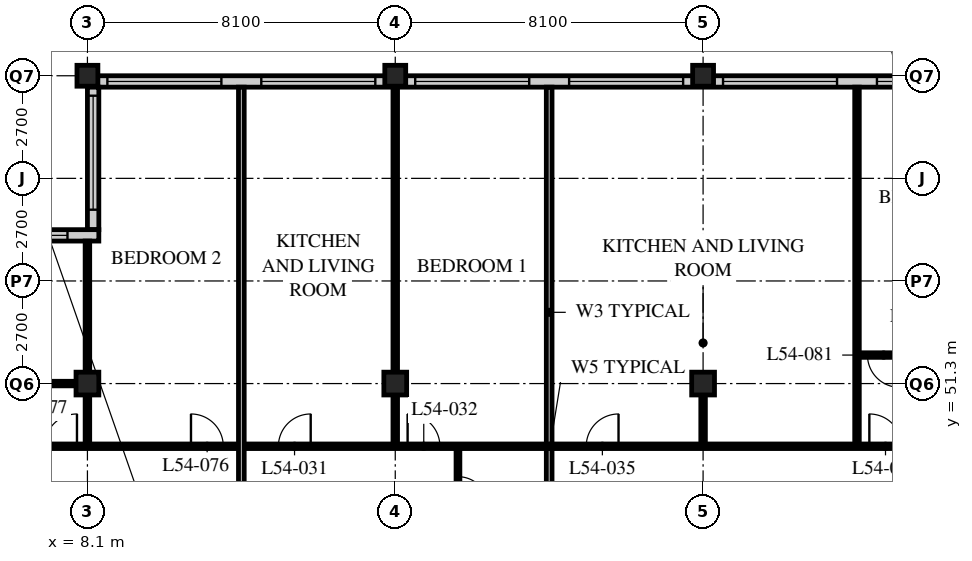
"""IFC4 building model, lengths in metres.
Left out: names, types, materials, properties, quantities, classifications, styles, units other than length and angle.
Written with IfcOpenShell. Run it as: python <this file> out.ifc"""

import sys

from ifc_helpers import new_model, si_unit, direction, frame, frame_2d, origin, origin_2d, place, context, subcontext, project, spatial, rectangle, hollow_rectangle, extrude, element, fill, save


model = new_model("IFC4")
c1 = context("Model", 3, precision=1e-05, world=origin(), true_north=direction((0.0, 1.0)))
c2 = subcontext(c1, "Body", "Model", "MODEL_VIEW")
j1 = project(units=[si_unit("LENGTHUNIT", "METRE"), si_unit("PLANEANGLEUNIT", "RADIAN")], contexts=[c1])
p1 = place(None, origin())
s1 = spatial("IfcSite", under=j1, at=p1, CompositionType="ELEMENT")
p2 = place(p1, origin())
s2 = spatial("IfcBuilding", under=s1, at=p2, CompositionType="ELEMENT")
p3 = place(p2, frame((0.0, 0.0, 210.0)))
s3 = spatial("IfcBuildingStorey", under=s2, at=p3, CompositionType="ELEMENT", Elevation=210.0)
p4 = place(p3, frame((8.1, 51.3, 0.0), z_axis=(0.0, 0.0, 1.0), x_axis=(1.0, 0.0, 0.0)))
e1 = element("IfcColumn", 1, at=p4, inside=s3, PredefinedType="COLUMN", context=c2, shape_type="SweptSolid", body=[
    extrude(hollow_rectangle(XDim=0.6, YDim=0.6, WallThickness=0.05, at=origin_2d()), origin(), (0.0, 0.0, 1.0), 3.6),
])
p5 = place(p3, frame((8.1, 59.4, 0.0), z_axis=(0.0, 0.0, 1.0), x_axis=(1.0, 0.0, 0.0)))
e2 = element("IfcColumn", 2, at=p5, inside=s3, PredefinedType="COLUMN", context=c2, shape_type="SweptSolid", body=[
    extrude(hollow_rectangle(XDim=0.55, YDim=0.55, WallThickness=0.045, at=origin_2d()), origin(), (0.0, 0.0, 1.0), 3.6),
])
p6 = place(p3, frame((16.2, 51.3, 0.0), z_axis=(0.0, 0.0, 1.0), x_axis=(1.0, 0.0, 0.0)))
e3 = element("IfcColumn", 3, at=p6, inside=s3, PredefinedType="COLUMN", context=c2, shape_type="SweptSolid", body=[
    extrude(hollow_rectangle(XDim=0.6, YDim=0.6, WallThickness=0.05, at=origin_2d()), origin(), (0.0, 0.0, 1.0), 3.6),
])
p7 = place(p3, frame((16.2, 59.4, 0.0), z_axis=(0.0, 0.0, 1.0), x_axis=(1.0, 0.0, 0.0)))
e4 = element("IfcColumn", 4, at=p7, inside=s3, PredefinedType="COLUMN", context=c2, shape_type="SweptSolid", body=[
    extrude(hollow_rectangle(XDim=0.55, YDim=0.55, WallThickness=0.045, at=origin_2d()), origin(), (0.0, 0.0, 1.0), 3.6),
])
p8 = place(p3, frame((24.3, 51.3, 0.0), z_axis=(0.0, 0.0, 1.0), x_axis=(1.0, 0.0, 0.0)))
e5 = element("IfcColumn", 5, at=p8, inside=s3, PredefinedType="COLUMN", context=c2, shape_type="SweptSolid", body=[
    extrude(hollow_rectangle(XDim=0.6, YDim=0.6, WallThickness=0.05, at=origin_2d()), origin(), (0.0, 0.0, 1.0), 3.6),
])
p9 = place(p3, frame((24.3, 59.4, 0.0), z_axis=(0.0, 0.0, 1.0), x_axis=(1.0, 0.0, 0.0)))
e6 = element("IfcColumn", 6, at=p9, inside=s3, PredefinedType="COLUMN", context=c2, shape_type="SweptSolid", body=[
    extrude(hollow_rectangle(XDim=0.55, YDim=0.55, WallThickness=0.045, at=origin_2d()), origin(), (0.0, 0.0, 1.0), 3.6),
])
p10 = place(p3, frame((48.3, 59.25, 0.0), z_axis=(0.0, 0.0, 1.0), x_axis=(-1.0, 0.0, 0.0)))
e7 = element("IfcWall", 7, at=p10, inside=s3, PredefinedType="SOLIDWALL", context=c2, shape_type="SweptSolid", body=[
    extrude(rectangle(XDim=40.2, YDim=0.3, at=frame_2d((20.1, 0.0))), origin(), (0.0, 0.0, 1.0), 3.39),
])
p11 = place(p10, frame((0.225, 0.0, 0.6)))
e8 = element("IfcOpeningElement", 8, at=p11, cuts=e7, PredefinedType="OPENING", context=c2, shape_type="SweptSolid", body=[
    extrude(rectangle(XDim=3.0, YDim=2.4, at=frame_2d((1.5, 1.2))), frame((0.0, 0.16, 0.0), z_axis=(0.0, -1.0, 0.0), x_axis=(1.0, 0.0, 0.0)), (0.0, 0.0, 1.0), 0.32),
])
p12 = place(p10, frame((4.275, 0.0, 0.6)))
e9 = element("IfcOpeningElement", 9, at=p12, cuts=e7, PredefinedType="OPENING", context=c2, shape_type="SweptSolid", body=[
    extrude(rectangle(XDim=3.0, YDim=2.4, at=frame_2d((1.5, 1.2))), frame((0.0, 0.16, 0.0), z_axis=(0.0, -1.0, 0.0), x_axis=(1.0, 0.0, 0.0)), (0.0, 0.0, 1.0), 0.32),
])
p13 = place(p10, frame((8.325, 0.0, 0.6)))
e10 = element("IfcOpeningElement", 10, at=p13, cuts=e7, PredefinedType="OPENING", context=c2, shape_type="SweptSolid", body=[
    extrude(rectangle(XDim=3.0, YDim=2.4, at=frame_2d((1.5, 1.2))), frame((0.0, 0.16, 0.0), z_axis=(0.0, -1.0, 0.0), x_axis=(1.0, 0.0, 0.0)), (0.0, 0.0, 1.0), 0.32),
])
p14 = place(p10, frame((12.375, 0.0, 0.6)))
e11 = element("IfcOpeningElement", 11, at=p14, cuts=e7, PredefinedType="OPENING", context=c2, shape_type="SweptSolid", body=[
    extrude(rectangle(XDim=3.0, YDim=2.4, at=frame_2d((1.5, 1.2))), frame((0.0, 0.16, 0.0), z_axis=(0.0, -1.0, 0.0), x_axis=(1.0, 0.0, 0.0)), (0.0, 0.0, 1.0), 0.32),
])
p15 = place(p10, frame((16.425, 0.0, 0.6)))
e12 = element("IfcOpeningElement", 12, at=p15, cuts=e7, PredefinedType="OPENING", context=c2, shape_type="SweptSolid", body=[
    extrude(rectangle(XDim=3.0, YDim=2.4, at=frame_2d((1.5, 1.2))), frame((0.0, 0.16, 0.0), z_axis=(0.0, -1.0, 0.0), x_axis=(1.0, 0.0, 0.0)), (0.0, 0.0, 1.0), 0.32),
])
p16 = place(p10, frame((20.475, 0.0, 0.6)))
e13 = element("IfcOpeningElement", 13, at=p16, cuts=e7, PredefinedType="OPENING", context=c2, shape_type="SweptSolid", body=[
    extrude(rectangle(XDim=3.0, YDim=2.4, at=frame_2d((1.5, 1.2))), frame((0.0, 0.16, 0.0), z_axis=(0.0, -1.0, 0.0), x_axis=(1.0, 0.0, 0.0)), (0.0, 0.0, 1.0), 0.32),
])
p17 = place(p10, frame((24.525, 0.0, 0.6)))
e14 = element("IfcOpeningElement", 14, at=p17, cuts=e7, PredefinedType="OPENING", context=c2, shape_type="SweptSolid", body=[
    extrude(rectangle(XDim=3.0, YDim=2.4, at=frame_2d((1.5, 1.2))), frame((0.0, 0.16, 0.0), z_axis=(0.0, -1.0, 0.0), x_axis=(1.0, 0.0, 0.0)), (0.0, 0.0, 1.0), 0.32),
])
p18 = place(p10, frame((28.575, 0.0, 0.6)))
e15 = element("IfcOpeningElement", 15, at=p18, cuts=e7, PredefinedType="OPENING", context=c2, shape_type="SweptSolid", body=[
    extrude(rectangle(XDim=3.0, YDim=2.4, at=frame_2d((1.5, 1.2))), frame((0.0, 0.16, 0.0), z_axis=(0.0, -1.0, 0.0), x_axis=(1.0, 0.0, 0.0)), (0.0, 0.0, 1.0), 0.32),
])
p19 = place(p10, frame((32.625, 0.0, 0.6)))
e16 = element("IfcOpeningElement", 16, at=p19, cuts=e7, PredefinedType="OPENING", context=c2, shape_type="SweptSolid", body=[
    extrude(rectangle(XDim=3.0, YDim=2.4, at=frame_2d((1.5, 1.2))), frame((0.0, 0.16, 0.0), z_axis=(0.0, -1.0, 0.0), x_axis=(1.0, 0.0, 0.0)), (0.0, 0.0, 1.0), 0.32),
])
p20 = place(p10, frame((36.675, 0.0, 0.6)))
e17 = element("IfcOpeningElement", 17, at=p20, cuts=e7, PredefinedType="OPENING", context=c2, shape_type="SweptSolid", body=[
    extrude(rectangle(XDim=3.0, YDim=2.4, at=frame_2d((1.5, 1.2))), frame((0.0, 0.16, 0.0), z_axis=(0.0, -1.0, 0.0), x_axis=(1.0, 0.0, 0.0)), (0.0, 0.0, 1.0), 0.32),
])
p21 = place(p3, frame((8.25, 59.1, 0.0), z_axis=(0.0, 0.0, 1.0), x_axis=(0.0, -1.0, 0.0)))
e18 = element("IfcWall", 18, at=p21, inside=s3, PredefinedType="SOLIDWALL", context=c2, shape_type="SweptSolid", body=[
    extrude(rectangle(XDim=3.75, YDim=0.3, at=frame_2d((1.875, 0.0))), origin(), (0.0, 0.0, 1.0), 3.39),
])
p22 = place(p21, frame((0.225, 0.0, 0.6)))
e19 = element("IfcOpeningElement", 19, at=p22, cuts=e18, PredefinedType="OPENING", context=c2, shape_type="SweptSolid", body=[
    extrude(rectangle(XDim=3.0, YDim=2.0, at=frame_2d((1.5, 1.0))), frame((0.0, 0.16, 0.0), z_axis=(0.0, -1.0, 0.0), x_axis=(1.0, 0.0, 0.0)), (0.0, 0.0, 1.0), 0.32),
])
p23 = place(p3, frame((8.4, 55.2, 0.0), z_axis=(0.0, 0.0, 1.0), x_axis=(-1.0, 0.0, 0.0)))
e20 = element("IfcWall", 20, at=p23, inside=s3, PredefinedType="SOLIDWALL", context=c2, shape_type="SweptSolid", body=[
    extrude(rectangle(XDim=4.35, YDim=0.3, at=frame_2d((2.175, 0.0))), origin(), (0.0, 0.0, 1.0), 3.39),
])
p24 = place(p23, frame((0.825, 0.0, 0.6)))
e21 = element("IfcOpeningElement", 21, at=p24, cuts=e20, PredefinedType="OPENING", context=c2, shape_type="SweptSolid", body=[
    extrude(rectangle(XDim=3.0, YDim=2.0, at=frame_2d((1.5, 1.0))), frame((0.0, 0.16, 0.0), z_axis=(0.0, -1.0, 0.0), x_axis=(1.0, 0.0, 0.0)), (0.0, 0.0, 1.0), 0.32),
])
p25 = place(p3, frame((17.85, 47.25, 0.0), z_axis=(0.0, 0.0, 1.0), x_axis=(0.0, 1.0, 0.0)))
e22 = element("IfcWall", 22, at=p25, inside=s3, PredefinedType="PARTITIONING", context=c2, shape_type="SweptSolid", body=[
    extrude(rectangle(XDim=2.4, YDim=0.1, at=frame_2d((1.2, 0.0))), origin(), (0.0, 0.0, 1.0), 3.39),
])
p26 = place(p25, frame((0.8, 0.0, 0.0)))
e23 = element("IfcOpeningElement", 23, at=p26, cuts=e22, PredefinedType="OPENING", context=c2, shape_type="SweptSolid", body=[
    extrude(rectangle(XDim=0.8, YDim=2.1, at=frame_2d((0.4, 1.05))), frame((0.0, 0.06, 0.0), z_axis=(0.0, -1.0, 0.0), x_axis=(1.0, 0.0, 0.0)), (0.0, 0.0, 1.0), 0.12),
])
p27 = place(p3, frame((16.2, 49.65, 0.0), z_axis=(0.0, 0.0, 1.0), x_axis=(0.0, 1.0, 0.0)))
e24 = element("IfcWall", 24, at=p27, inside=s3, PredefinedType="PARTITIONING", context=c2, shape_type="SweptSolid", body=[
    extrude(rectangle(XDim=9.45, YDim=0.12, at=frame_2d((4.725, 0.0))), origin(), (0.0, 0.0, 1.0), 2.778),
])
p28 = place(p3, frame((20.25, 47.25, 0.0), z_axis=(0.0, 0.0, 1.0), x_axis=(0.0, 1.0, 0.0)))
e25 = element("IfcWall", 25, at=p28, inside=s3, PredefinedType="PARTITIONING", context=c2, shape_type="SweptSolid", body=[
    extrude(rectangle(XDim=11.85, YDim=0.15, at=frame_2d((5.925, 0.0))), origin(), (0.0, 0.0, 1.0), 3.39),
])
p29 = place(p3, frame((28.35, 49.65, 0.0), z_axis=(0.0, 0.0, 1.0), x_axis=(0.0, 1.0, 0.0)))
e26 = element("IfcWall", 26, at=p29, inside=s3, PredefinedType="PARTITIONING", context=c2, shape_type="SweptSolid", body=[
    extrude(rectangle(XDim=9.45, YDim=0.12, at=frame_2d((4.725, 0.0))), origin(), (0.0, 0.0, 1.0), 3.39),
])
p30 = place(p3, frame((4.1, 49.65, 0.0), z_axis=(0.0, 0.0, 1.0), x_axis=(1.0, 0.0, 0.0)))
e27 = element("IfcWall", 27, at=p30, inside=s3, PredefinedType="PARTITIONING", context=c2, shape_type="SweptSolid", body=[
    extrude(rectangle(XDim=32.35, YDim=0.12, at=frame_2d((16.175, 0.0))), origin(), (0.0, 0.0, 1.0), 3.39),
])
p31 = place(p30, frame((9.025, 0.0, 0.0)))
e28 = element("IfcOpeningElement", 28, at=p31, cuts=e27, PredefinedType="OPENING", context=c2, shape_type="SweptSolid", body=[
    extrude(rectangle(XDim=0.85, YDim=2.1, at=frame_2d((0.425, 1.05))), frame((0.0, 0.07, 0.0), z_axis=(0.0, -1.0, 0.0), x_axis=(1.0, 0.0, 0.0)), (0.0, 0.0, 1.0), 0.14),
])
p32 = place(p30, frame((12.425, 0.0, 0.0)))
e29 = element("IfcOpeningElement", 29, at=p32, cuts=e27, PredefinedType="OPENING", context=c2, shape_type="SweptSolid", body=[
    extrude(rectangle(XDim=0.85, YDim=2.1, at=frame_2d((0.425, 1.05))), frame((0.0, 0.07, 0.0), z_axis=(0.0, -1.0, 0.0), x_axis=(1.0, 0.0, 0.0)), (0.0, 0.0, 1.0), 0.14),
])
p33 = place(p30, frame((17.125, 0.0, 0.0)))
e30 = element("IfcOpeningElement", 30, at=p33, cuts=e27, PredefinedType="OPENING", context=c2, shape_type="SweptSolid", body=[
    extrude(rectangle(XDim=0.85, YDim=2.1, at=frame_2d((0.425, 1.05))), frame((0.0, 0.07, 0.0), z_axis=(0.0, -1.0, 0.0), x_axis=(1.0, 0.0, 0.0)), (0.0, 0.0, 1.0), 0.14),
])
p34 = place(p30, frame((24.575, 0.0, 0.0)))
e31 = element("IfcOpeningElement", 31, at=p34, cuts=e27, PredefinedType="OPENING", context=c2, shape_type="SweptSolid", body=[
    extrude(rectangle(XDim=0.85, YDim=2.1, at=frame_2d((0.425, 1.05))), frame((0.0, 0.07, 0.0), z_axis=(0.0, -1.0, 0.0), x_axis=(1.0, 0.0, 0.0)), (0.0, 0.0, 1.0), 0.14),
])
p35 = place(p30, frame((28.625, 0.0, 0.0)))
e32 = element("IfcOpeningElement", 32, at=p35, cuts=e27, PredefinedType="OPENING", context=c2, shape_type="SweptSolid", body=[
    extrude(rectangle(XDim=0.85, YDim=2.1, at=frame_2d((0.425, 1.05))), frame((0.0, 0.07, 0.0), z_axis=(0.0, -1.0, 0.0), x_axis=(1.0, 0.0, 0.0)), (0.0, 0.0, 1.0), 0.14),
])
p36 = place(p30, frame((6.725, 0.0, 0.0)))
e33 = element("IfcOpeningElement", 33, at=p36, cuts=e27, PredefinedType="OPENING", context=c2, shape_type="SweptSolid", body=[
    extrude(rectangle(XDim=0.85, YDim=2.1, at=frame_2d((0.425, 1.05))), frame((0.0, 0.07, 0.0), z_axis=(0.0, -1.0, 0.0), x_axis=(1.0, 0.0, 0.0)), (0.0, 0.0, 1.0), 0.14),
])
p37 = place(p30, frame((2.875, 0.0, 0.0)))
e34 = element("IfcOpeningElement", 34, at=p37, cuts=e27, PredefinedType="OPENING", context=c2, shape_type="SweptSolid", body=[
    extrude(rectangle(XDim=0.85, YDim=2.1, at=frame_2d((0.425, 1.05))), frame((0.0, 0.07, 0.0), z_axis=(0.0, -1.0, 0.0), x_axis=(1.0, 0.0, 0.0)), (0.0, 0.0, 1.0), 0.14),
])
p38 = place(p3, frame((8.1, 49.65, 0.0), z_axis=(0.0, 0.0, 1.0), x_axis=(0.0, 1.0, 0.0)))
e35 = element("IfcWall", 35, at=p38, inside=s3, PredefinedType="PARTITIONING", context=c2, shape_type="SweptSolid", body=[
    extrude(rectangle(XDim=5.4, YDim=0.12, at=frame_2d((2.7, 0.0))), origin(), (0.0, 0.0, 1.0), 2.778),
])
p39 = place(p3, frame((8.1, 51.3, 0.0), z_axis=(0.0, 0.0, 1.0), x_axis=(-1.0, 0.0, 0.0)))
e36 = element("IfcWall", 36, at=p39, inside=s3, PredefinedType="PARTITIONING", context=c2, shape_type="SweptSolid", body=[
    extrude(rectangle(XDim=3.75, YDim=0.12, at=frame_2d((1.875, 0.0))), origin(), (0.0, 0.0, 1.0), 2.778),
])
p40 = place(p39, frame((1.875, 0.0, 0.0)))
e37 = element("IfcOpeningElement", 37, at=p40, cuts=e36, PredefinedType="OPENING", context=c2, shape_type="SweptSolid", body=[
    extrude(rectangle(XDim=0.85, YDim=2.1, at=frame_2d((0.425, 1.05))), frame((0.0, 0.07, 0.0), z_axis=(0.0, -1.0, 0.0), x_axis=(1.0, 0.0, 0.0)), (0.0, 0.0, 1.0), 0.14),
])
p41 = place(p3, frame((12.15, 47.25, 0.0), z_axis=(0.0, 0.0, 1.0), x_axis=(0.0, 1.0, 0.0)))
e38 = element("IfcWall", 38, at=p41, inside=s3, PredefinedType="PARTITIONING", context=c2, shape_type="SweptSolid", body=[
    extrude(rectangle(XDim=11.85, YDim=0.15, at=frame_2d((5.925, 0.0))), origin(), (0.0, 0.0, 1.0), 3.39),
])
p42 = place(p3, frame((28.35, 52.05, 0.0), z_axis=(0.0, 0.0, 1.0), x_axis=(1.0, 0.0, 0.0)))
e39 = element("IfcWall", 39, at=p42, inside=s3, PredefinedType="PARTITIONING", context=c2, shape_type="SweptSolid", body=[
    extrude(rectangle(XDim=1.76, YDim=0.12, at=frame_2d((0.88, 0.0))), origin(), (0.0, 0.0, 1.0), 3.39),
])
p43 = place(p42, frame((0.275, 0.0, 0.0)))
e40 = element("IfcOpeningElement", 40, at=p43, cuts=e39, PredefinedType="OPENING", context=c2, shape_type="SweptSolid", body=[
    extrude(rectangle(XDim=0.85, YDim=2.1, at=frame_2d((0.425, 1.05))), frame((0.0, 0.07, 0.0), z_axis=(0.0, -1.0, 0.0), x_axis=(1.0, 0.0, 0.0)), (0.0, 0.0, 1.0), 0.14),
])
p44 = place(p3, frame((24.3, 49.65, 0.0), z_axis=(0.0, 0.0, 1.0), x_axis=(0.0, 1.0, 0.0)))
e41 = element("IfcWall", 41, at=p44, inside=s3, PredefinedType="PARTITIONING", context=c2, shape_type="SweptSolid", body=[
    extrude(rectangle(XDim=1.35, YDim=0.12, at=frame_2d((0.675, 0.0))), origin(), (0.0, 0.0, 1.0), 2.778),
])
p45 = place(p15, origin())
e42 = element("IfcWindow", 42, at=p45, inside=s3, PartitioningType="SINGLE_PANEL", PredefinedType="WINDOW", context=c2, shape_type="SweptSolid", body=[
    extrude(rectangle(XDim=3.0, YDim=2.4, at=frame_2d((1.5, 1.2))), frame((0.0, 0.03, 0.0), z_axis=(0.0, -1.0, 0.0), x_axis=(1.0, 0.0, 0.0)), (0.0, 0.0, 1.0), 0.06),
])
fill(e12, e42)
p46 = place(p16, origin())
e43 = element("IfcWindow", 43, at=p46, inside=s3, PartitioningType="SINGLE_PANEL", PredefinedType="WINDOW", context=c2, shape_type="SweptSolid", body=[
    extrude(rectangle(XDim=3.0, YDim=2.4, at=frame_2d((1.5, 1.2))), frame((0.0, 0.03, 0.0), z_axis=(0.0, -1.0, 0.0), x_axis=(1.0, 0.0, 0.0)), (0.0, 0.0, 1.0), 0.06),
])
fill(e13, e43)
p47 = place(p17, origin())
e44 = element("IfcWindow", 44, at=p47, inside=s3, PartitioningType="SINGLE_PANEL", PredefinedType="WINDOW", context=c2, shape_type="SweptSolid", body=[
    extrude(rectangle(XDim=3.0, YDim=2.4, at=frame_2d((1.5, 1.2))), frame((0.0, 0.03, 0.0), z_axis=(0.0, -1.0, 0.0), x_axis=(1.0, 0.0, 0.0)), (0.0, 0.0, 1.0), 0.06),
])
fill(e14, e44)
p48 = place(p18, origin())
e45 = element("IfcWindow", 45, at=p48, inside=s3, PartitioningType="SINGLE_PANEL", PredefinedType="WINDOW", context=c2, shape_type="SweptSolid", body=[
    extrude(rectangle(XDim=3.0, YDim=2.4, at=frame_2d((1.5, 1.2))), frame((0.0, 0.03, 0.0), z_axis=(0.0, -1.0, 0.0), x_axis=(1.0, 0.0, 0.0)), (0.0, 0.0, 1.0), 0.06),
])
fill(e15, e45)
p49 = place(p19, origin())
e46 = element("IfcWindow", 46, at=p49, inside=s3, PartitioningType="SINGLE_PANEL", PredefinedType="WINDOW", context=c2, shape_type="SweptSolid", body=[
    extrude(rectangle(XDim=3.0, YDim=2.4, at=frame_2d((1.5, 1.2))), frame((0.0, 0.03, 0.0), z_axis=(0.0, -1.0, 0.0), x_axis=(1.0, 0.0, 0.0)), (0.0, 0.0, 1.0), 0.06),
])
fill(e16, e46)
p50 = place(p20, origin())
e47 = element("IfcWindow", 47, at=p50, inside=s3, PartitioningType="SINGLE_PANEL", PredefinedType="WINDOW", context=c2, shape_type="SweptSolid", body=[
    extrude(rectangle(XDim=3.0, YDim=2.4, at=frame_2d((1.5, 1.2))), frame((0.0, 0.03, 0.0), z_axis=(0.0, -1.0, 0.0), x_axis=(1.0, 0.0, 0.0)), (0.0, 0.0, 1.0), 0.06),
])
fill(e17, e47)
p51 = place(p22, origin())
e48 = element("IfcWindow", 48, at=p51, inside=s3, PartitioningType="SINGLE_PANEL", PredefinedType="WINDOW", context=c2, shape_type="SweptSolid", body=[
    extrude(rectangle(XDim=3.0, YDim=2.0, at=frame_2d((1.5, 1.0))), frame((0.0, 0.03, 0.0), z_axis=(0.0, -1.0, 0.0), x_axis=(1.0, 0.0, 0.0)), (0.0, 0.0, 1.0), 0.06),
])
fill(e19, e48)
p52 = place(p24, origin())
e49 = element("IfcWindow", 49, at=p52, inside=s3, PartitioningType="SINGLE_PANEL", PredefinedType="WINDOW", context=c2, shape_type="SweptSolid", body=[
    extrude(rectangle(XDim=3.0, YDim=2.0, at=frame_2d((1.5, 1.0))), frame((0.0, 0.03, 0.0), z_axis=(0.0, -1.0, 0.0), x_axis=(1.0, 0.0, 0.0)), (0.0, 0.0, 1.0), 0.06),
])
fill(e21, e49)
p53 = place(p26, origin())
e50 = element("IfcDoor", 50, at=p53, inside=s3, OperationType="SINGLE_SWING_RIGHT", PredefinedType="DOOR", context=c2, shape_type="SweptSolid", body=[
    extrude(rectangle(XDim=0.8, YDim=2.1, at=frame_2d((0.4, 1.05))), frame((0.0, 0.025, 0.0), z_axis=(0.0, -1.0, 0.0), x_axis=(1.0, 0.0, 0.0)), (0.0, 0.0, 1.0), 0.05),
])
fill(e23, e50)
p54 = place(p31, origin())
e51 = element("IfcDoor", 51, at=p54, inside=s3, OperationType="SINGLE_SWING_RIGHT", PredefinedType="DOOR", context=c2, shape_type="SweptSolid", body=[
    extrude(rectangle(XDim=0.85, YDim=2.1, at=frame_2d((0.425, 1.05))), frame((0.0, 0.025, 0.0), z_axis=(0.0, -1.0, 0.0), x_axis=(1.0, 0.0, 0.0)), (0.0, 0.0, 1.0), 0.05),
])
fill(e28, e51)
p55 = place(p32, origin())
e52 = element("IfcDoor", 52, at=p55, inside=s3, OperationType="SINGLE_SWING_LEFT", PredefinedType="DOOR", context=c2, shape_type="SweptSolid", body=[
    extrude(rectangle(XDim=0.85, YDim=2.1, at=frame_2d((0.425, 1.05))), frame((0.0, 0.025, 0.0), z_axis=(0.0, -1.0, 0.0), x_axis=(1.0, 0.0, 0.0)), (0.0, 0.0, 1.0), 0.05),
])
fill(e29, e52)
p56 = place(p33, origin())
e53 = element("IfcDoor", 53, at=p56, inside=s3, OperationType="SINGLE_SWING_RIGHT", PredefinedType="DOOR", context=c2, shape_type="SweptSolid", body=[
    extrude(rectangle(XDim=0.85, YDim=2.1, at=frame_2d((0.425, 1.05))), frame((0.0, 0.025, 0.0), z_axis=(0.0, -1.0, 0.0), x_axis=(1.0, 0.0, 0.0)), (0.0, 0.0, 1.0), 0.05),
])
fill(e30, e53)
p57 = place(p34, origin())
e54 = element("IfcDoor", 54, at=p57, inside=s3, OperationType="SINGLE_SWING_LEFT", PredefinedType="DOOR", context=c2, shape_type="SweptSolid", body=[
    extrude(rectangle(XDim=0.85, YDim=2.1, at=frame_2d((0.425, 1.05))), frame((0.0, 0.025, 0.0), z_axis=(0.0, -1.0, 0.0), x_axis=(1.0, 0.0, 0.0)), (0.0, 0.0, 1.0), 0.05),
])
fill(e31, e54)
p58 = place(p36, origin())
e55 = element("IfcDoor", 55, at=p58, inside=s3, OperationType="SINGLE_SWING_LEFT", PredefinedType="DOOR", context=c2, shape_type="SweptSolid", body=[
    extrude(rectangle(XDim=0.85, YDim=2.1, at=frame_2d((0.425, 1.05))), frame((0.0, 0.025, 0.0), z_axis=(0.0, -1.0, 0.0), x_axis=(1.0, 0.0, 0.0)), (0.0, 0.0, 1.0), 0.05),
])
fill(e33, e55)
p59 = place(p37, origin())
e56 = element("IfcDoor", 56, at=p59, inside=s3, OperationType="SINGLE_SWING_RIGHT", PredefinedType="DOOR", context=c2, shape_type="SweptSolid", body=[
    extrude(rectangle(XDim=0.85, YDim=2.1, at=frame_2d((0.425, 1.05))), frame((0.0, 0.025, 0.0), z_axis=(0.0, -1.0, 0.0), x_axis=(1.0, 0.0, 0.0)), (0.0, 0.0, 1.0), 0.05),
])
fill(e34, e56)
p60 = place(p43, origin())
e57 = element("IfcDoor", 57, at=p60, inside=s3, OperationType="SINGLE_SWING_LEFT", PredefinedType="DOOR", context=c2, shape_type="SweptSolid", body=[
    extrude(rectangle(XDim=0.85, YDim=2.1, at=frame_2d((0.425, 1.05))), frame((0.0, 0.025, 0.0), z_axis=(0.0, -1.0, 0.0), x_axis=(1.0, 0.0, 0.0)), (0.0, 0.0, 1.0), 0.05),
])
fill(e40, e57)
save(model, sys.argv[1])
